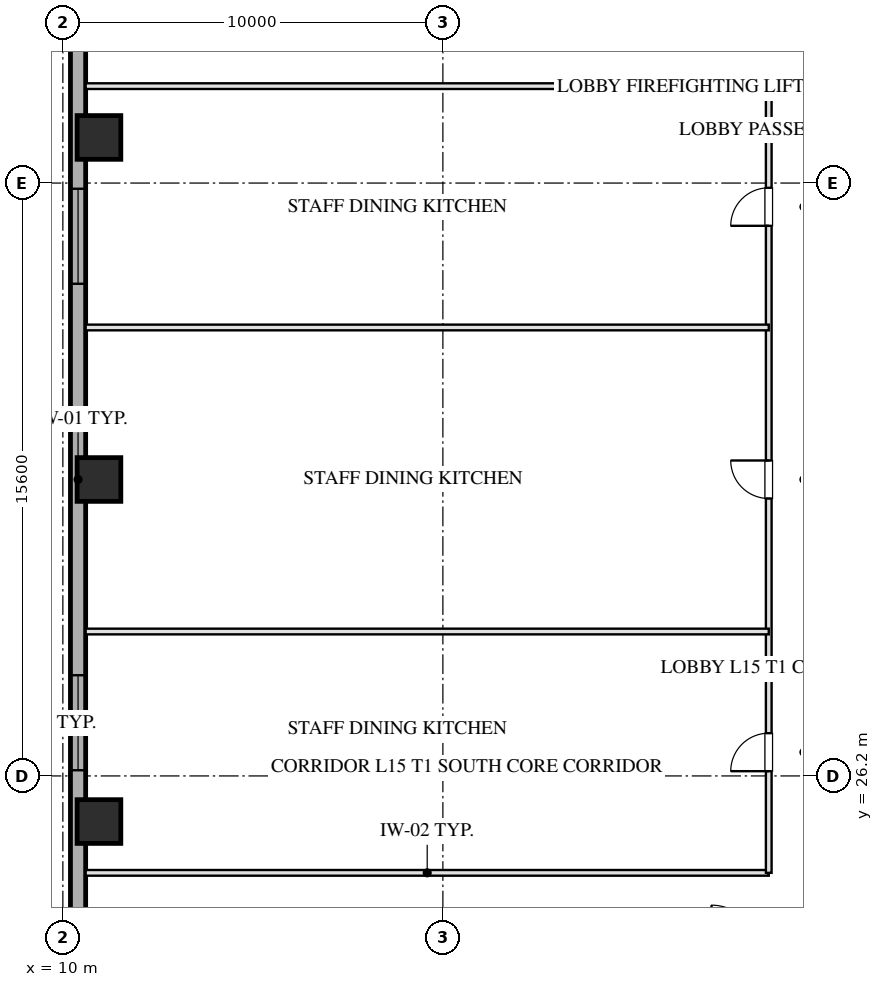
"""IFC4 building model, lengths in metres.
Left out: names, types, materials, properties, quantities, classifications, styles, units other than length and angle.
Written with IfcOpenShell. Run it as: python <this file> out.ifc"""

import sys

from ifc_helpers import new_model, si_unit, direction, frame, frame_2d, origin, origin_2d, place, context, subcontext, project, spatial, rectangle, hollow_rectangle, extrude, element, fill, save


model = new_model("IFC4")
c1 = context("Model", 3, precision=1e-05, world=origin(), true_north=direction((0.0, 1.0)))
c2 = subcontext(c1, "Body", "Model", "MODEL_VIEW")
j1 = project(units=[si_unit("LENGTHUNIT", "METRE"), si_unit("PLANEANGLEUNIT", "RADIAN")], contexts=[c1])
p1 = place(None, origin())
s1 = spatial("IfcSite", under=j1, at=p1, CompositionType="ELEMENT")
p2 = place(p1, origin())
s2 = spatial("IfcBuilding", under=s1, at=p2, CompositionType="ELEMENT")
p3 = place(p2, frame((0.0, 0.0, 64.4)))
s3 = spatial("IfcBuildingStorey", under=s2, at=p3, CompositionType="ELEMENT", Elevation=64.4)
for number, where, z_axis, x_axis in (
    (1, (10.95, 25.0, 0.0), (0.0, 0.0, 1.0), (1.0, 0.0, 0.0)),
    (2, (10.95, 34.0, 0.0), (0.0, 0.0, 1.0), (1.0, 0.0, 0.0)),
    (3, (10.95, 43.0, 0.0), (0.0, 0.0, 1.0), (1.0, 0.0, 0.0)),
):
    element("IfcColumn", number, at=place(p3, frame(where, z_axis=z_axis, x_axis=x_axis)), inside=s3, PredefinedType="COLUMN", context=c2, shape_type="SweptSolid", body=[
        extrude(hollow_rectangle(XDim=1.15, YDim=1.15, WallThickness=0.04, at=origin_2d()), origin(), (0.0, 0.0, 1.0), 3.451),
    ])
p4 = place(p3, frame((10.4, 7.2, 0.0), z_axis=(0.0, 0.0, 1.0), x_axis=(0.0, 1.0, 0.0)))
e4 = element("IfcWall", 4, at=p4, inside=s3, PredefinedType="SOLIDWALL", context=c2, shape_type="SweptSolid", body=[
    extrude(rectangle(XDim=53.6, YDim=0.4, at=frame_2d((26.8, 0.0))), origin(), (0.0, 0.0, 1.0), 2.61),
])
p5 = place(p4, frame((19.15, 0.0, 0.75)))
e5 = element("IfcOpeningElement", 5, at=p5, cuts=e4, PredefinedType="OPENING", context=c2, shape_type="SweptSolid", body=[
    extrude(rectangle(XDim=2.5, YDim=1.46, at=frame_2d((1.25, 0.73))), frame((0.0, 0.21, 0.0), z_axis=(0.0, -1.0, 0.0), x_axis=(1.0, 0.0, 0.0)), (0.0, 0.0, 1.0), 0.42),
])
p6 = place(p4, frame((31.95, 0.0, 0.75)))
e6 = element("IfcOpeningElement", 6, at=p6, cuts=e4, PredefinedType="OPENING", context=c2, shape_type="SweptSolid", body=[
    extrude(rectangle(XDim=2.5, YDim=1.46, at=frame_2d((1.25, 0.73))), frame((0.0, 0.21, 0.0), z_axis=(0.0, -1.0, 0.0), x_axis=(1.0, 0.0, 0.0)), (0.0, 0.0, 1.0), 0.42),
])
for number, where, z_axis, x_axis in (
    (7, (10.6, 23.65, 0.0), (0.0, 0.0, 1.0), (1.0, 0.0, 0.0)),
    (8, (10.6, 44.35, 0.0), (0.0, 0.0, 1.0), (1.0, 0.0, 0.0)),
):
    element("IfcWall", number, at=place(p3, frame(where, z_axis=z_axis, x_axis=x_axis)), inside=s3, PredefinedType="PARTITIONING", context=c2, shape_type="SweptSolid", body=[
        extrude(rectangle(XDim=17.975, YDim=0.15, at=frame_2d((8.987, 0.0))), origin(), (0.0, 0.0, 1.0), 3.175),
    ])
p7 = place(p3, frame((28.575, 23.65, 0.0), z_axis=(0.0, 0.0, 1.0), x_axis=(0.0, 1.0, 0.0)))
e9 = element("IfcWall", 9, at=p7, inside=s3, PredefinedType="PARTITIONING", context=c2, shape_type="SweptSolid", body=[
    extrude(rectangle(XDim=20.7, YDim=0.15, at=frame_2d((10.35, 0.0))), origin(), (0.0, 0.0, 1.0), 3.175),
])
p8 = place(p7, frame((2.675, 0.0, 0.0)))
e10 = element("IfcOpeningElement", 10, at=p8, cuts=e9, PredefinedType="OPENING", context=c2, shape_type="SweptSolid", body=[
    extrude(rectangle(XDim=1.0, YDim=2.05, at=frame_2d((0.5, 1.025))), frame((0.0, 0.085, 0.0), z_axis=(0.0, -1.0, 0.0), x_axis=(1.0, 0.0, 0.0)), (0.0, 0.0, 1.0), 0.17),
])
p9 = place(p7, frame((9.85, 0.0, 0.0)))
e11 = element("IfcOpeningElement", 11, at=p9, cuts=e9, PredefinedType="OPENING", context=c2, shape_type="SweptSolid", body=[
    extrude(rectangle(XDim=1.0, YDim=2.05, at=frame_2d((0.5, 1.025))), frame((0.0, 0.085, 0.0), z_axis=(0.0, -1.0, 0.0), x_axis=(1.0, 0.0, 0.0)), (0.0, 0.0, 1.0), 0.17),
])
p10 = place(p7, frame((17.025, 0.0, 0.0)))
e12 = element("IfcOpeningElement", 12, at=p10, cuts=e9, PredefinedType="OPENING", context=c2, shape_type="SweptSolid", body=[
    extrude(rectangle(XDim=1.0, YDim=2.05, at=frame_2d((0.5, 1.025))), frame((0.0, 0.085, 0.0), z_axis=(0.0, -1.0, 0.0), x_axis=(1.0, 0.0, 0.0)), (0.0, 0.0, 1.0), 0.17),
])
for number, where, z_axis, x_axis in (
    (13, (10.6, 30.0, 0.0), (0.0, 0.0, 1.0), (1.0, 0.0, 0.0)),
    (14, (10.6, 38.0, 0.0), (0.0, 0.0, 1.0), (1.0, 0.0, 0.0)),
):
    element("IfcWall", number, at=place(p3, frame(where, z_axis=z_axis, x_axis=x_axis)), inside=s3, PredefinedType="PARTITIONING", context=c2, shape_type="SweptSolid", body=[
        extrude(rectangle(XDim=17.975, YDim=0.15, at=frame_2d((8.987, 0.0))), origin(), (0.0, 0.0, 1.0), 3.175),
    ])
p11 = place(p5, origin())
e15 = element("IfcWindow", 15, at=p11, inside=s3, PartitioningType="TRIPLE_PANEL_VERTICAL", PredefinedType="WINDOW", context=c2, shape_type="SweptSolid", body=[
    extrude(rectangle(XDim=2.5, YDim=1.46, at=frame_2d((1.25, 0.73))), frame((0.0, 0.03, 0.0), z_axis=(0.0, -1.0, 0.0), x_axis=(1.0, 0.0, 0.0)), (0.0, 0.0, 1.0), 0.06),
])
fill(e5, e15)
p12 = place(p6, origin())
e16 = element("IfcWindow", 16, at=p12, inside=s3, PartitioningType="TRIPLE_PANEL_VERTICAL", PredefinedType="WINDOW", context=c2, shape_type="SweptSolid", body=[
    extrude(rectangle(XDim=2.5, YDim=1.46, at=frame_2d((1.25, 0.73))), frame((0.0, 0.03, 0.0), z_axis=(0.0, -1.0, 0.0), x_axis=(1.0, 0.0, 0.0)), (0.0, 0.0, 1.0), 0.06),
])
fill(e6, e16)
p13 = place(p8, origin())
e17 = element("IfcDoor", 17, at=p13, inside=s3, OperationType="SINGLE_SWING_LEFT", PredefinedType="DOOR", context=c2, shape_type="SweptSolid", body=[
    extrude(rectangle(XDim=1.0, YDim=2.05, at=frame_2d((0.5, 1.025))), frame((0.0, 0.025, 0.0), z_axis=(0.0, -1.0, 0.0), x_axis=(1.0, 0.0, 0.0)), (0.0, 0.0, 1.0), 0.05),
])
fill(e10, e17)
p14 = place(p9, origin())
e18 = element("IfcDoor", 18, at=p14, inside=s3, OperationType="SINGLE_SWING_RIGHT", PredefinedType="DOOR", context=c2, shape_type="SweptSolid", body=[
    extrude(rectangle(XDim=1.0, YDim=2.05, at=frame_2d((0.5, 1.025))), frame((0.0, 0.025, 0.0), z_axis=(0.0, -1.0, 0.0), x_axis=(1.0, 0.0, 0.0)), (0.0, 0.0, 1.0), 0.05),
])
fill(e11, e18)
p15 = place(p10, origin())
e19 = element("IfcDoor", 19, at=p15, inside=s3, OperationType="SINGLE_SWING_LEFT", PredefinedType="DOOR", context=c2, shape_type="SweptSolid", body=[
    extrude(rectangle(XDim=1.0, YDim=2.05, at=frame_2d((0.5, 1.025))), frame((0.0, 0.025, 0.0), z_axis=(0.0, -1.0, 0.0), x_axis=(1.0, 0.0, 0.0)), (0.0, 0.0, 1.0), 0.05),
])
fill(e12, e19)
save(model, sys.argv[1])
